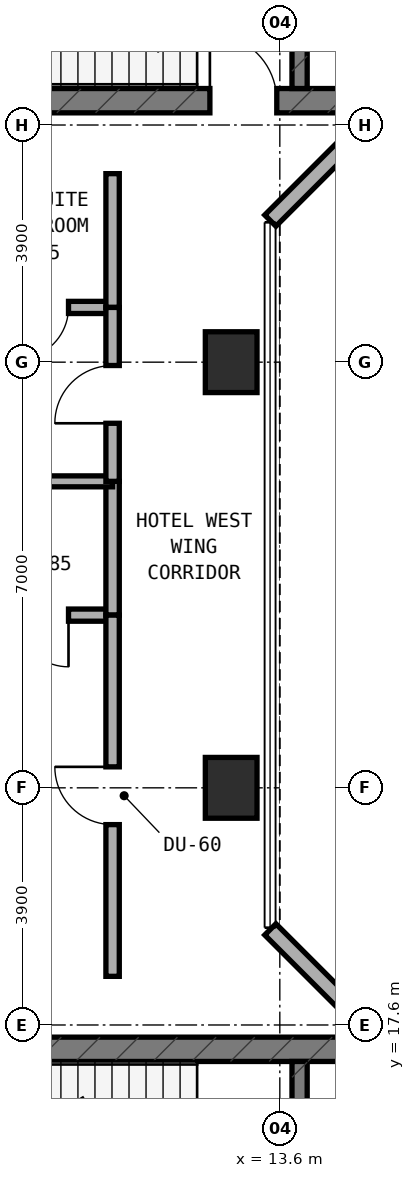
"""IFC4 building model, lengths in metres.
Left out: names, types, materials, properties, quantities, classifications, styles, units other than length and angle.
Written with IfcOpenShell. Run it as: python <this file> out.ifc"""

import sys

from ifc_helpers import new_model, si_unit, direction, frame, frame_2d, origin, origin_2d, place, context, subcontext, project, spatial, rectangle, extrude, element, fill, save


model = new_model("IFC4")
c1 = context("Model", 3, precision=1e-05, world=origin(), true_north=direction((0.0, 1.0)))
c2 = subcontext(c1, "Body", "Model", "MODEL_VIEW")
j1 = project(units=[si_unit("LENGTHUNIT", "METRE"), si_unit("PLANEANGLEUNIT", "RADIAN")], contexts=[c1])
p1 = place(None, origin())
s1 = spatial("IfcSite", under=j1, at=p1, CompositionType="ELEMENT")
p2 = place(p1, origin())
s2 = spatial("IfcBuilding", under=s1, at=p2, CompositionType="ELEMENT")
p3 = place(p2, frame((0.0, 0.0, 124.0)))
s3 = spatial("IfcBuildingStorey", under=s2, at=p3, CompositionType="ELEMENT", Elevation=124.0)
p4 = place(p3, frame((6.4, 32.8, 0.0), z_axis=(0.0, 0.0, 1.0), x_axis=(1.0, 0.0, 0.0)))
e1 = element("IfcWall", 1, at=p4, inside=s3, PredefinedType="SHEAR", context=c2, shape_type="SweptSolid", body=[
    extrude(rectangle(XDim=24.4, YDim=0.4, at=frame_2d((12.2, 0.0))), origin(), (0.0, 0.0, 1.0), 3.5),
])
p5 = place(p4, frame((6.05, 0.0, 0.0)))
e2 = element("IfcOpeningElement", 2, at=p5, cuts=e1, PredefinedType="OPENING", context=c2, shape_type="SweptSolid", body=[
    extrude(rectangle(XDim=1.1, YDim=2.15, at=frame_2d((0.55, 1.075))), frame((0.0, 0.21, 0.0), z_axis=(0.0, -1.0, 0.0), x_axis=(1.0, 0.0, 0.0)), (0.0, 0.0, 1.0), 0.42),
])
p6 = place(p3, frame((13.925, 33.0, 0.0), z_axis=(0.0, 0.0, 1.0), x_axis=(0.0, 1.0, 0.0)))
e3 = element("IfcWall", 3, at=p6, inside=s3, PredefinedType="STANDARD", context=c2, shape_type="SweptSolid", body=[
    extrude(rectangle(XDim=3.16, YDim=0.25, at=frame_2d((1.58, 0.0))), origin(), (0.0, 0.0, 1.0), 3.22),
])
p7 = place(p6, frame((0.98, 0.0, 0.0)))
e4 = element("IfcOpeningElement", 4, at=p7, cuts=e3, PredefinedType="OPENING", context=c2, shape_type="SweptSolid", body=[
    extrude(rectangle(XDim=1.1, YDim=2.15, at=frame_2d((0.55, 1.075))), frame((0.0, 0.135, 0.0), z_axis=(0.0, -1.0, 0.0), x_axis=(1.0, 0.0, 0.0)), (0.0, 0.0, 1.0), 0.27),
])
p8 = place(p3, frame((6.4, 17.2, 0.0), z_axis=(0.0, 0.0, 1.0), x_axis=(1.0, 0.0, 0.0)))
e5 = element("IfcWall", 5, at=p8, inside=s3, PredefinedType="SHEAR", context=c2, shape_type="SweptSolid", body=[
    extrude(rectangle(XDim=24.4, YDim=0.4, at=frame_2d((12.2, 0.0))), origin(), (0.0, 0.0, 1.0), 3.5),
])
p9 = place(p3, frame((13.925, 13.84, 0.0), z_axis=(0.0, 0.0, 1.0), x_axis=(0.0, 1.0, 0.0)))
e6 = element("IfcWall", 6, at=p9, inside=s3, PredefinedType="STANDARD", context=c2, shape_type="SweptSolid", body=[
    extrude(rectangle(XDim=3.16, YDim=0.25, at=frame_2d((1.58, 0.0))), origin(), (0.0, 0.0, 1.0), 3.22),
])
p10 = place(p9, frame((0.98, 0.0, 0.0)))
e7 = element("IfcOpeningElement", 7, at=p10, cuts=e6, PredefinedType="OPENING", context=c2, shape_type="SweptSolid", body=[
    extrude(rectangle(XDim=1.1, YDim=2.15, at=frame_2d((0.55, 1.075))), frame((0.0, 0.135, 0.0), z_axis=(0.0, -1.0, 0.0), x_axis=(1.0, 0.0, 0.0)), (0.0, 0.0, 1.0), 0.27),
])
for number, where, z_axis, x_axis in (
    (8, (12.8, 21.5, 0.0), (0.0, 0.0, 1.0), (1.0, 0.0, 0.0)),
    (9, (12.8, 28.5, 0.0), (0.0, 0.0, 1.0), (1.0, 0.0, 0.0)),
):
    element("IfcColumn", number, at=place(p3, frame(where, z_axis=z_axis, x_axis=x_axis)), inside=s3, PredefinedType="COLUMN", context=c2, shape_type="SweptSolid", body=[
        extrude(rectangle(XDim=0.85, YDim=1.0, at=origin_2d()), origin(), (0.0, 0.0, 1.0), 3.5),
    ])
for number, where, z_axis, x_axis in (
    (10, (15.278, 32.662, 0.0), (0.0, 0.0, 1.0), (-0.707, -0.707, 0.0)),
    (11, (13.444, 19.172, 0.0), (0.0, 0.0, 1.0), (0.707, -0.707, 0.0)),
):
    element("IfcWall", number, at=place(p3, frame(where, z_axis=z_axis, x_axis=x_axis)), inside=s3, PredefinedType="STANDARD", context=c2, shape_type="SweptSolid", body=[
        extrude(rectangle(XDim=2.594, YDim=0.26, at=frame_2d((1.297, 0.0))), origin(), (0.0, 0.0, 1.0), 3.22),
    ])
p11 = place(p3, frame((8.65, 24.34, 0.0), z_axis=(0.0, 0.0, 1.0), x_axis=(1.0, 0.0, 0.0)))
e12 = element("IfcWall", 12, at=p11, inside=s3, PredefinedType="PLUMBINGWALL", context=c2, shape_type="SweptSolid", body=[
    extrude(rectangle(XDim=2.1, YDim=0.2, at=frame_2d((1.05, 0.0))), origin(), (0.0, 0.0, 1.0), 3.22),
])
p12 = place(p11, frame((0.625, 0.0, 0.0)))
e13 = element("IfcOpeningElement", 13, at=p12, cuts=e12, PredefinedType="OPENING", context=c2, shape_type="SweptSolid", body=[
    extrude(rectangle(XDim=0.85, YDim=2.1, at=frame_2d((0.425, 1.05))), frame((0.0, 0.11, 0.0), z_axis=(0.0, -1.0, 0.0), x_axis=(1.0, 0.0, 0.0)), (0.0, 0.0, 1.0), 0.22),
])
p13 = place(p3, frame((10.85, 24.34, 0.0), z_axis=(0.0, 0.0, 1.0), x_axis=(0.0, 1.0, 0.0)))
e14 = element("IfcWall", 14, at=p13, inside=s3, PredefinedType="SOLIDWALL", context=c2, shape_type="SweptSolid", body=[
    extrude(rectangle(XDim=2.2, YDim=0.22, at=frame_2d((1.1, 0.0))), origin(), (0.0, 0.0, 1.0), 3.22),
])
p14 = place(p3, frame((10.85, 18.4, 0.0), z_axis=(0.0, 0.0, 1.0), x_axis=(0.0, 1.0, 0.0)))
e15 = element("IfcWall", 15, at=p14, inside=s3, PredefinedType="SOLIDWALL", context=c2, shape_type="SweptSolid", body=[
    extrude(rectangle(XDim=5.94, YDim=0.22, at=frame_2d((2.97, 0.0))), origin(), (0.0, 0.0, 1.0), 2.695),
])
p15 = place(p14, frame((2.495, 0.0, 0.0)))
e16 = element("IfcOpeningElement", 16, at=p15, cuts=e15, PredefinedType="OPENING", context=c2, shape_type="SweptSolid", body=[
    extrude(rectangle(XDim=0.95, YDim=2.1, at=frame_2d((0.475, 1.05))), frame((0.0, 0.12, 0.0), z_axis=(0.0, -1.0, 0.0), x_axis=(1.0, 0.0, 0.0)), (0.0, 0.0, 1.0), 0.24),
])
p16 = place(p3, frame((0.86, 26.54, 0.0), z_axis=(0.0, 0.0, 1.0), x_axis=(1.0, 0.0, 0.0)))
e17 = element("IfcWall", 17, at=p16, inside=s3, PredefinedType="SOLIDWALL", context=c2, shape_type="SweptSolid", body=[
    extrude(rectangle(XDim=9.99, YDim=0.18, at=frame_2d((4.995, 0.0))), origin(), (0.0, 0.0, 1.0), 2.835),
])
p17 = place(p3, frame((8.65, 29.4, 0.0), z_axis=(0.0, 0.0, 1.0), x_axis=(1.0, 0.0, 0.0)))
e18 = element("IfcWall", 18, at=p17, inside=s3, PredefinedType="PLUMBINGWALL", context=c2, shape_type="SweptSolid", body=[
    extrude(rectangle(XDim=2.1, YDim=0.2, at=frame_2d((1.05, 0.0))), origin(), (0.0, 0.0, 1.0), 3.22),
])
p18 = place(p17, frame((0.625, 0.0, 0.0)))
e19 = element("IfcOpeningElement", 19, at=p18, cuts=e18, PredefinedType="OPENING", context=c2, shape_type="SweptSolid", body=[
    extrude(rectangle(XDim=0.85, YDim=2.1, at=frame_2d((0.425, 1.05))), frame((0.0, 0.11, 0.0), z_axis=(0.0, -1.0, 0.0), x_axis=(1.0, 0.0, 0.0)), (0.0, 0.0, 1.0), 0.22),
])
p19 = place(p3, frame((10.85, 29.4, 0.0), z_axis=(0.0, 0.0, 1.0), x_axis=(0.0, 1.0, 0.0)))
e20 = element("IfcWall", 20, at=p19, inside=s3, PredefinedType="SOLIDWALL", context=c2, shape_type="SweptSolid", body=[
    extrude(rectangle(XDim=2.2, YDim=0.22, at=frame_2d((1.1, 0.0))), origin(), (0.0, 0.0, 1.0), 3.22),
])
p20 = place(p3, frame((10.85, 26.54, 0.0), z_axis=(0.0, 0.0, 1.0), x_axis=(0.0, 1.0, 0.0)))
e21 = element("IfcWall", 21, at=p20, inside=s3, PredefinedType="SOLIDWALL", context=c2, shape_type="SweptSolid", body=[
    extrude(rectangle(XDim=2.86, YDim=0.22, at=frame_2d((1.43, 0.0))), origin(), (0.0, 0.0, 1.0), 2.695),
])
p21 = place(p20, frame((0.955, 0.0, 0.0)))
e22 = element("IfcOpeningElement", 22, at=p21, cuts=e21, PredefinedType="OPENING", context=c2, shape_type="SweptSolid", body=[
    extrude(rectangle(XDim=0.95, YDim=2.1, at=frame_2d((0.475, 1.05))), frame((0.0, 0.12, 0.0), z_axis=(0.0, -1.0, 0.0), x_axis=(1.0, 0.0, 0.0)), (0.0, 0.0, 1.0), 0.24),
])
p22 = place(p5, origin())
e23 = element("IfcDoor", 23, at=p22, inside=s3, OperationType="SINGLE_SWING_LEFT", PredefinedType="DOOR", context=c2, shape_type="SweptSolid", body=[
    extrude(rectangle(XDim=1.1, YDim=2.15, at=frame_2d((0.55, 1.075))), frame((0.0, 0.025, 0.0), z_axis=(0.0, -1.0, 0.0), x_axis=(1.0, 0.0, 0.0)), (0.0, 0.0, 1.0), 0.05),
])
fill(e2, e23)
p23 = place(p12, frame((0.85, 0.0, 0.0), z_axis=(0.0, 0.0, 1.0), x_axis=(-1.0, 0.0, 0.0)))
e24 = element("IfcDoor", 24, at=p23, inside=s3, OperationType="SINGLE_SWING_LEFT", PredefinedType="DOOR", context=c2, shape_type="SweptSolid", body=[
    extrude(rectangle(XDim=0.85, YDim=2.1, at=frame_2d((0.425, 1.05))), frame((0.0, 0.025, 0.0), z_axis=(0.0, -1.0, 0.0), x_axis=(1.0, 0.0, 0.0)), (0.0, 0.0, 1.0), 0.05),
])
fill(e13, e24)
p24 = place(p15, origin())
e25 = element("IfcDoor", 25, at=p24, inside=s3, OperationType="SINGLE_SWING_RIGHT", PredefinedType="DOOR", context=c2, shape_type="SweptSolid", body=[
    extrude(rectangle(XDim=0.95, YDim=2.1, at=frame_2d((0.475, 1.05))), frame((0.0, 0.025, 0.0), z_axis=(0.0, -1.0, 0.0), x_axis=(1.0, 0.0, 0.0)), (0.0, 0.0, 1.0), 0.05),
])
fill(e16, e25)
p25 = place(p18, frame((0.85, 0.0, 0.0), z_axis=(0.0, 0.0, 1.0), x_axis=(-1.0, 0.0, 0.0)))
e26 = element("IfcDoor", 26, at=p25, inside=s3, OperationType="SINGLE_SWING_RIGHT", PredefinedType="DOOR", context=c2, shape_type="SweptSolid", body=[
    extrude(rectangle(XDim=0.85, YDim=2.1, at=frame_2d((0.425, 1.05))), frame((0.0, 0.025, 0.0), z_axis=(0.0, -1.0, 0.0), x_axis=(1.0, 0.0, 0.0)), (0.0, 0.0, 1.0), 0.05),
])
fill(e19, e26)
p26 = place(p21, origin())
e27 = element("IfcDoor", 27, at=p26, inside=s3, OperationType="SINGLE_SWING_LEFT", PredefinedType="DOOR", context=c2, shape_type="SweptSolid", body=[
    extrude(rectangle(XDim=0.95, YDim=2.1, at=frame_2d((0.475, 1.05))), frame((0.0, 0.025, 0.0), z_axis=(0.0, -1.0, 0.0), x_axis=(1.0, 0.0, 0.0)), (0.0, 0.0, 1.0), 0.05),
])
fill(e22, e27)
save(model, sys.argv[1])
